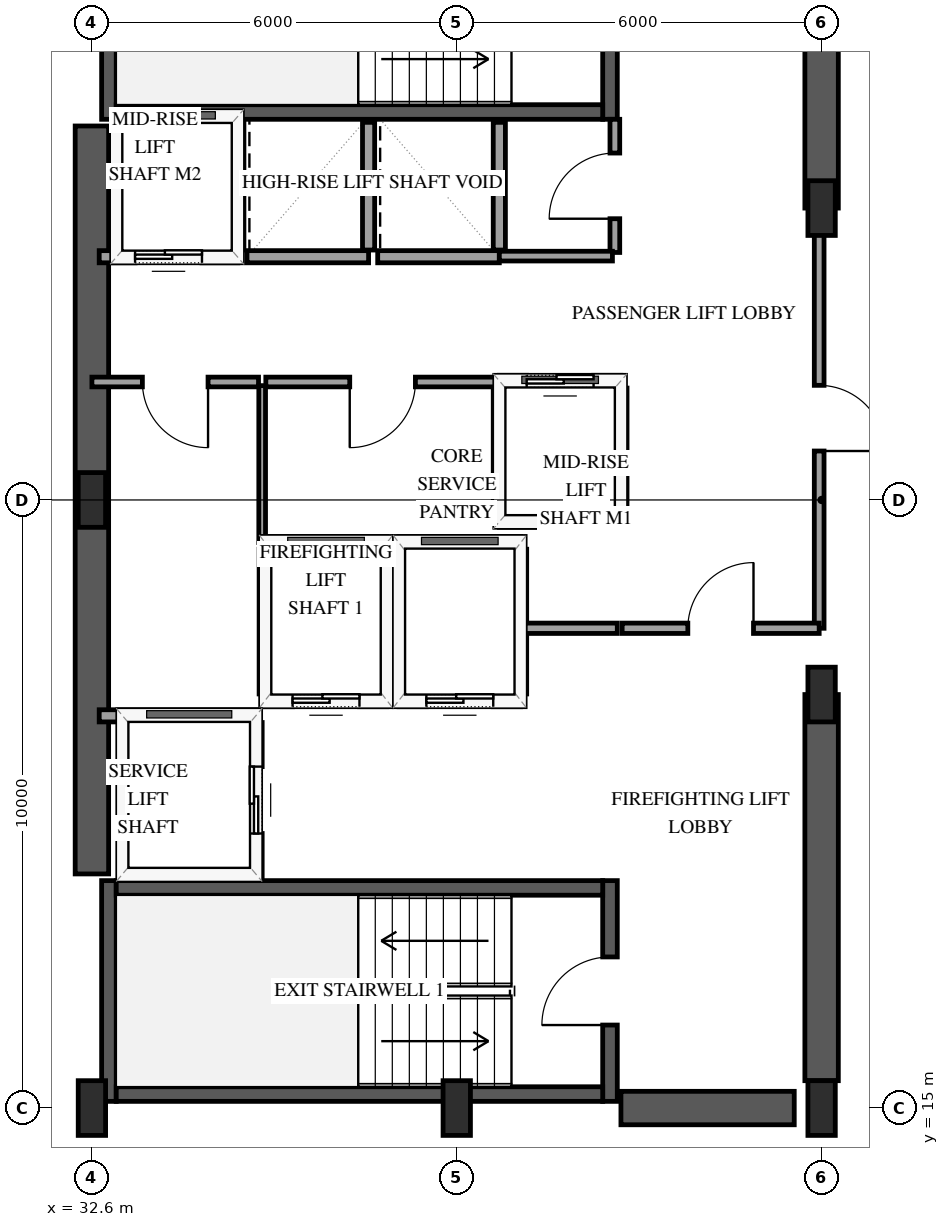
"""IFC4 building model, lengths in metres.
Left out: names, types, materials, properties, quantities, classifications, styles, units other than length and angle.
Written with IfcOpenShell. Run it as: python <this file> out.ifc"""

import sys

from ifc_helpers import new_model, si_unit, direction, frame, frame_2d, origin, origin_2d, place, context, subcontext, project, spatial, rectangle, extrude, element, fill, save


model = new_model("IFC4")
c1 = context("Model", 3, precision=1e-05, world=origin(), true_north=direction((0.0, 1.0)))
c2 = subcontext(c1, "Body", "Model", "MODEL_VIEW")
j1 = project(units=[si_unit("LENGTHUNIT", "METRE"), si_unit("PLANEANGLEUNIT", "RADIAN")], contexts=[c1])
p1 = place(None, origin())
s1 = spatial("IfcSite", under=j1, at=p1, CompositionType="ELEMENT")
p2 = place(p1, origin())
s2 = spatial("IfcBuilding", under=s1, at=p2, CompositionType="ELEMENT")
p3 = place(p2, frame((0.0, 0.0, 178.6)))
s3 = spatial("IfcBuildingStorey", under=s2, at=p3, CompositionType="ELEMENT", Elevation=178.6)
p4 = place(p3, frame((32.88, 15.11, 0.0), z_axis=(0.0, 0.0, 1.0), x_axis=(0.0, 1.0, 0.0)))
e1 = element("IfcWall", 1, at=p4, inside=s3, PredefinedType="SHEAR", context=c2, shape_type="SweptSolid", body=[
    extrude(rectangle(XDim=3.63, YDim=0.24, at=frame_2d((1.815, 0.0))), origin(), (0.0, 0.0, 1.0), 3.6),
])
p5 = place(p3, frame((41.12, 15.11, 0.0), z_axis=(0.0, 0.0, 1.0), x_axis=(0.0, 1.0, 0.0)))
e2 = element("IfcWall", 2, at=p5, inside=s3, PredefinedType="SHEAR", context=c2, shape_type="SweptSolid", body=[
    extrude(rectangle(XDim=3.63, YDim=0.24, at=frame_2d((1.815, 0.0))), origin(), (0.0, 0.0, 1.0), 3.6),
])
p6 = place(p5, frame((1.255, 0.0, 0.0)))
e3 = element("IfcOpeningElement", 3, at=p6, cuts=e2, PredefinedType="OPENING", context=c2, shape_type="SweptSolid", body=[
    extrude(rectangle(XDim=1.12, YDim=2.15, at=frame_2d((0.56, 1.075))), frame((0.0, 0.13, 0.0), z_axis=(0.0, -1.0, 0.0), x_axis=(1.0, 0.0, 0.0)), (0.0, 0.0, 1.0), 0.26),
])
for number, where, z_axis, x_axis in (
    (4, (33.0, 15.23, 0.0), (0.0, 0.0, 1.0), (1.0, 0.0, 0.0)),
    (5, (33.0, 18.62, 0.0), (0.0, 0.0, 1.0), (1.0, 0.0, 0.0)),
):
    element("IfcWall", number, at=place(p3, frame(where, z_axis=z_axis, x_axis=x_axis)), inside=s3, PredefinedType="SHEAR", context=c2, shape_type="SweptSolid", body=[
        extrude(rectangle(XDim=8.0, YDim=0.24, at=frame_2d((4.0, 0.0))), origin(), (0.0, 0.0, 1.0), 3.6),
    ])
p7 = place(p3, frame((32.88, 31.26, 0.0), z_axis=(0.0, 0.0, 1.0), x_axis=(0.0, 1.0, 0.0)))
e6 = element("IfcWall", 6, at=p7, inside=s3, PredefinedType="SHEAR", context=c2, shape_type="SweptSolid", body=[
    extrude(rectangle(XDim=3.63, YDim=0.24, at=frame_2d((1.815, 0.0))), origin(), (0.0, 0.0, 1.0), 3.6),
])
p8 = place(p3, frame((41.12, 31.26, 0.0), z_axis=(0.0, 0.0, 1.0), x_axis=(0.0, 1.0, 0.0)))
e7 = element("IfcWall", 7, at=p8, inside=s3, PredefinedType="SHEAR", context=c2, shape_type="SweptSolid", body=[
    extrude(rectangle(XDim=3.63, YDim=0.24, at=frame_2d((1.815, 0.0))), origin(), (0.0, 0.0, 1.0), 3.6),
])
p9 = place(p8, frame((1.255, 0.0, 0.0)))
e8 = element("IfcOpeningElement", 8, at=p9, cuts=e7, PredefinedType="OPENING", context=c2, shape_type="SweptSolid", body=[
    extrude(rectangle(XDim=1.12, YDim=2.15, at=frame_2d((0.56, 1.075))), frame((0.0, 0.13, 0.0), z_axis=(0.0, -1.0, 0.0), x_axis=(1.0, 0.0, 0.0)), (0.0, 0.0, 1.0), 0.26),
])
p10 = place(p3, frame((33.0, 31.38, 0.0), z_axis=(0.0, 0.0, 1.0), x_axis=(1.0, 0.0, 0.0)))
e9 = element("IfcWall", 9, at=p10, inside=s3, PredefinedType="SHEAR", context=c2, shape_type="SweptSolid", body=[
    extrude(rectangle(XDim=8.0, YDim=0.24, at=frame_2d((4.0, 0.0))), origin(), (0.0, 0.0, 1.0), 3.6),
])
p11 = place(p3, frame((32.6, 18.85, 0.0), z_axis=(0.0, 0.0, 1.0), x_axis=(0.0, 1.0, 0.0)))
e10 = element("IfcWall", 10, at=p11, inside=s3, PredefinedType="SHEAR", context=c2, shape_type="SweptSolid", body=[
    extrude(rectangle(XDim=12.3, YDim=0.55, at=frame_2d((6.15, 0.0))), origin(), (0.0, 0.0, 1.0), 3.6),
])
p12 = place(p3, frame((41.3, 15.0, 0.0), z_axis=(0.0, 0.0, 1.0), x_axis=(1.0, 0.0, 0.0)))
e11 = element("IfcWall", 11, at=p12, inside=s3, PredefinedType="SHEAR", context=c2, shape_type="SweptSolid", body=[
    extrude(rectangle(XDim=2.85, YDim=0.55, at=frame_2d((1.425, 0.0))), origin(), (0.0, 0.0, 1.0), 3.6),
])
p13 = place(p3, frame((44.6, 15.45, 0.0), z_axis=(0.0, 0.0, 1.0), x_axis=(0.0, 1.0, 0.0)))
e12 = element("IfcWall", 12, at=p13, inside=s3, PredefinedType="SHEAR", context=c2, shape_type="SweptSolid", body=[
    extrude(rectangle(XDim=6.35, YDim=0.55, at=frame_2d((3.175, 0.0))), origin(), (0.0, 0.0, 1.0), 3.6),
])
p14 = place(p3, frame((44.6, 29.8, 0.0), z_axis=(0.0, 0.0, 1.0), x_axis=(0.0, 1.0, 0.0)))
e13 = element("IfcWall", 13, at=p14, inside=s3, PredefinedType="SHEAR", context=c2, shape_type="SweptSolid", body=[
    extrude(rectangle(XDim=4.75, YDim=0.55, at=frame_2d((2.375, 0.0))), origin(), (0.0, 0.0, 1.0), 3.6),
])
for number, where, z_axis, x_axis in (
    (14, (32.6, 15.0, 0.0), (0.0, 0.0, 1.0), (1.0, 0.0, 0.0)),
    (15, (32.6, 25.0, 0.0), (0.0, 0.0, 1.0), (1.0, 0.0, 0.0)),
    (16, (38.6, 15.0, 0.0), (0.0, 0.0, 1.0), (1.0, 0.0, 0.0)),
    (17, (44.6, 15.0, 0.0), (0.0, 0.0, 1.0), (1.0, 0.0, 0.0)),
    (18, (44.6, 21.8, 0.0), (0.0, 0.0, 1.0), (1.0, 0.0, 0.0)),
    (19, (44.6, 29.8, 0.0), (0.0, 0.0, 1.0), (1.0, 0.0, 0.0)),
):
    element("IfcColumn", number, at=place(p3, frame(where, z_axis=z_axis, x_axis=x_axis)), inside=s3, PredefinedType="PILASTER", context=c2, shape_type="SweptSolid", body=[
        extrude(rectangle(XDim=0.45, YDim=0.9, at=origin_2d()), origin(), (0.0, 0.0, 1.0), 3.6),
    ])
p15 = place(p3, frame((35.45, 21.7, 0.0), z_axis=(0.0, 0.0, 1.0), x_axis=(1.0, 0.0, 0.0)))
e20 = element("IfcWall", 20, at=p15, inside=s3, PredefinedType="SOLIDWALL", context=c2, shape_type="SweptSolid", body=[
    extrude(rectangle(XDim=2.0, YDim=0.2, at=frame_2d((1.0, 0.0))), origin(), (0.0, 0.0, 1.0), 3.3),
])
p16 = place(p15, frame((0.45, 0.0, 0.0)))
e21 = element("IfcOpeningElement", 21, at=p16, cuts=e20, PredefinedType="OPENING", context=c2, shape_type="SweptSolid", body=[
    extrude(rectangle(XDim=1.1, YDim=2.15, at=frame_2d((0.55, 1.075))), frame((0.0, 0.11, 0.0), z_axis=(0.0, -1.0, 0.0), x_axis=(1.0, 0.0, 0.0)), (0.0, 0.0, 1.0), 0.22),
])
p17 = place(p3, frame((35.45, 24.3, 0.0), z_axis=(0.0, 0.0, 1.0), x_axis=(1.0, 0.0, 0.0)))
e22 = element("IfcWall", 22, at=p17, inside=s3, PredefinedType="SOLIDWALL", context=c2, shape_type="SweptSolid", body=[
    extrude(rectangle(XDim=2.0, YDim=0.2, at=frame_2d((1.0, 0.0))), origin(), (0.0, 0.0, 1.0), 3.3),
])
for number, where, z_axis, x_axis in (
    (23, (35.45, 21.81, 0.0), (0.0, 0.0, 1.0), (0.0, 1.0, 0.0)),
    (24, (37.45, 21.81, 0.0), (0.0, 0.0, 1.0), (0.0, 1.0, 0.0)),
):
    element("IfcWall", number, at=place(p3, frame(where, z_axis=z_axis, x_axis=x_axis)), inside=s3, PredefinedType="SOLIDWALL", context=c2, shape_type="SweptSolid", body=[
        extrude(rectangle(XDim=2.38, YDim=0.2, at=frame_2d((1.19, 0.0))), origin(), (0.0, 0.0, 1.0), 3.3),
    ])
p18 = place(p3, frame((37.65, 21.7, 0.0), z_axis=(0.0, 0.0, 1.0), x_axis=(1.0, 0.0, 0.0)))
e25 = element("IfcWall", 25, at=p18, inside=s3, PredefinedType="SOLIDWALL", context=c2, shape_type="SweptSolid", body=[
    extrude(rectangle(XDim=2.0, YDim=0.2, at=frame_2d((1.0, 0.0))), origin(), (0.0, 0.0, 1.0), 3.3),
])
p19 = place(p18, frame((0.45, 0.0, 0.0)))
e26 = element("IfcOpeningElement", 26, at=p19, cuts=e25, PredefinedType="OPENING", context=c2, shape_type="SweptSolid", body=[
    extrude(rectangle(XDim=1.1, YDim=2.15, at=frame_2d((0.55, 1.075))), frame((0.0, 0.11, 0.0), z_axis=(0.0, -1.0, 0.0), x_axis=(1.0, 0.0, 0.0)), (0.0, 0.0, 1.0), 0.22),
])
p20 = place(p3, frame((37.65, 24.3, 0.0), z_axis=(0.0, 0.0, 1.0), x_axis=(1.0, 0.0, 0.0)))
e27 = element("IfcWall", 27, at=p20, inside=s3, PredefinedType="SOLIDWALL", context=c2, shape_type="SweptSolid", body=[
    extrude(rectangle(XDim=2.0, YDim=0.2, at=frame_2d((1.0, 0.0))), origin(), (0.0, 0.0, 1.0), 3.3),
])
p21 = place(p3, frame((39.65, 21.81, 0.0), z_axis=(0.0, 0.0, 1.0), x_axis=(0.0, 1.0, 0.0)))
e28 = element("IfcWall", 28, at=p21, inside=s3, PredefinedType="SOLIDWALL", context=c2, shape_type="SweptSolid", body=[
    extrude(rectangle(XDim=2.38, YDim=0.2, at=frame_2d((1.19, 0.0))), origin(), (0.0, 0.0, 1.0), 3.3),
])
p22 = place(p3, frame((32.72, 21.45, 0.0), z_axis=(0.0, 0.0, 1.0), x_axis=(1.0, 0.0, 0.0)))
e29 = element("IfcWall", 29, at=p22, inside=s3, PredefinedType="SOLIDWALL", context=c2, shape_type="SweptSolid", body=[
    extrude(rectangle(XDim=2.58, YDim=0.2, at=frame_2d((1.29, 0.0))), origin(), (0.0, 0.0, 1.0), 3.3),
])
p23 = place(p3, frame((35.3, 18.79, 0.0), z_axis=(0.0, 0.0, 1.0), x_axis=(0.0, 1.0, 0.0)))
e30 = element("IfcWall", 30, at=p23, inside=s3, PredefinedType="SOLIDWALL", context=c2, shape_type="SweptSolid", body=[
    extrude(rectangle(XDim=2.55, YDim=0.2, at=frame_2d((1.275, 0.0))), origin(), (0.0, 0.0, 1.0), 3.3),
])
p24 = place(p23, frame((0.725, 0.0, 0.0)))
e31 = element("IfcOpeningElement", 31, at=p24, cuts=e30, PredefinedType="OPENING", context=c2, shape_type="SweptSolid", body=[
    extrude(rectangle(XDim=1.1, YDim=2.15, at=frame_2d((0.55, 1.075))), frame((0.0, 0.11, 0.0), z_axis=(0.0, -1.0, 0.0), x_axis=(1.0, 0.0, 0.0)), (0.0, 0.0, 1.0), 0.22),
])
p25 = place(p3, frame((39.3, 24.65, 0.0), z_axis=(0.0, 0.0, 1.0), x_axis=(1.0, 0.0, 0.0)))
e32 = element("IfcWall", 32, at=p25, inside=s3, PredefinedType="SOLIDWALL", context=c2, shape_type="SweptSolid", body=[
    extrude(rectangle(XDim=2.0, YDim=0.2, at=frame_2d((1.0, 0.0))), origin(), (0.0, 0.0, 1.0), 3.3),
])
p26 = place(p3, frame((39.3, 26.95, 0.0), z_axis=(0.0, 0.0, 1.0), x_axis=(1.0, 0.0, 0.0)))
e33 = element("IfcWall", 33, at=p26, inside=s3, PredefinedType="SOLIDWALL", context=c2, shape_type="SweptSolid", body=[
    extrude(rectangle(XDim=2.0, YDim=0.2, at=frame_2d((1.0, 0.0))), origin(), (0.0, 0.0, 1.0), 3.3),
])
p27 = place(p26, frame((0.45, 0.0, 0.0)))
e34 = element("IfcOpeningElement", 34, at=p27, cuts=e33, PredefinedType="OPENING", context=c2, shape_type="SweptSolid", body=[
    extrude(rectangle(XDim=1.1, YDim=2.15, at=frame_2d((0.55, 1.075))), frame((0.0, 0.11, 0.0), z_axis=(0.0, -1.0, 0.0), x_axis=(1.0, 0.0, 0.0)), (0.0, 0.0, 1.0), 0.22),
])
for number, where, z_axis, x_axis in (
    (35, (39.3, 24.76, 0.0), (0.0, 0.0, 1.0), (0.0, 1.0, 0.0)),
    (36, (41.3, 24.76, 0.0), (0.0, 0.0, 1.0), (0.0, 1.0, 0.0)),
):
    element("IfcWall", number, at=place(p3, frame(where, z_axis=z_axis, x_axis=x_axis)), inside=s3, PredefinedType="SOLIDWALL", context=c2, shape_type="SweptSolid", body=[
        extrude(rectangle(XDim=2.08, YDim=0.2, at=frame_2d((1.04, 0.0))), origin(), (0.0, 0.0, 1.0), 3.3),
    ])
p28 = place(p3, frame((32.72, 29.0, 0.0), z_axis=(0.0, 0.0, 1.0), x_axis=(1.0, 0.0, 0.0)))
e37 = element("IfcWall", 37, at=p28, inside=s3, PredefinedType="SOLIDWALL", context=c2, shape_type="SweptSolid", body=[
    extrude(rectangle(XDim=2.28, YDim=0.2, at=frame_2d((1.14, 0.0))), origin(), (0.0, 0.0, 1.0), 3.3),
])
p29 = place(p28, frame((0.59, 0.0, 0.0)))
e38 = element("IfcOpeningElement", 38, at=p29, cuts=e37, PredefinedType="OPENING", context=c2, shape_type="SweptSolid", body=[
    extrude(rectangle(XDim=1.1, YDim=2.15, at=frame_2d((0.55, 1.075))), frame((0.0, 0.11, 0.0), z_axis=(0.0, -1.0, 0.0), x_axis=(1.0, 0.0, 0.0)), (0.0, 0.0, 1.0), 0.22),
])
p30 = place(p3, frame((35.0, 29.11, 0.0), z_axis=(0.0, 0.0, 1.0), x_axis=(0.0, 1.0, 0.0)))
e39 = element("IfcWall", 39, at=p30, inside=s3, PredefinedType="SOLIDWALL", context=c2, shape_type="SweptSolid", body=[
    extrude(rectangle(XDim=2.1, YDim=0.2, at=frame_2d((1.05, 0.0))), origin(), (0.0, 0.0, 1.0), 3.3),
])
p31 = place(p3, frame((35.15, 29.0, 0.0), z_axis=(0.0, 0.0, 1.0), x_axis=(1.0, 0.0, 0.0)))
e40 = element("IfcWall", 40, at=p31, inside=s3, PredefinedType="SOLIDWALL", context=c2, shape_type="SweptSolid", body=[
    extrude(rectangle(XDim=2.0, YDim=0.2, at=frame_2d((1.0, 0.0))), origin(), (0.0, 0.0, 1.0), 3.3),
])
p32 = place(p3, frame((37.15, 29.11, 0.0), z_axis=(0.0, 0.0, 1.0), x_axis=(0.0, 1.0, 0.0)))
e41 = element("IfcWall", 41, at=p32, inside=s3, PredefinedType="SOLIDWALL", context=c2, shape_type="SweptSolid", body=[
    extrude(rectangle(XDim=2.1, YDim=0.2, at=frame_2d((1.05, 0.0))), origin(), (0.0, 0.0, 1.0), 3.3),
])
p33 = place(p3, frame((37.3, 29.0, 0.0), z_axis=(0.0, 0.0, 1.0), x_axis=(1.0, 0.0, 0.0)))
e42 = element("IfcWall", 42, at=p33, inside=s3, PredefinedType="SOLIDWALL", context=c2, shape_type="SweptSolid", body=[
    extrude(rectangle(XDim=2.0, YDim=0.2, at=frame_2d((1.0, 0.0))), origin(), (0.0, 0.0, 1.0), 3.3),
])
p34 = place(p3, frame((39.3, 29.11, 0.0), z_axis=(0.0, 0.0, 1.0), x_axis=(0.0, 1.0, 0.0)))
e43 = element("IfcWall", 43, at=p34, inside=s3, PredefinedType="SOLIDWALL", context=c2, shape_type="SweptSolid", body=[
    extrude(rectangle(XDim=2.1, YDim=0.2, at=frame_2d((1.05, 0.0))), origin(), (0.0, 0.0, 1.0), 3.3),
])
p35 = place(p3, frame((44.56, 29.8, 0.0), z_axis=(0.0, 0.0, 1.0), x_axis=(0.0, -1.0, 0.0)))
e44 = element("IfcWall", 44, at=p35, inside=s3, PredefinedType="PARTITIONING", context=c2, shape_type="SweptSolid", body=[
    extrude(rectangle(XDim=6.91, YDim=0.16, at=frame_2d((3.455, 0.0))), origin(), (0.0, 0.0, 1.0), 2.34),
])
p36 = place(p35, frame((2.915, 0.0, 0.0)))
e45 = element("IfcOpeningElement", 45, at=p36, cuts=e44, PredefinedType="OPENING", context=c2, shape_type="SweptSolid", body=[
    extrude(rectangle(XDim=1.08, YDim=2.15, at=frame_2d((0.54, 1.075))), frame((0.0, 0.09, 0.0), z_axis=(0.0, -1.0, 0.0), x_axis=(1.0, 0.0, 0.0)), (0.0, 0.0, 1.0), 0.18),
])
p37 = place(p3, frame((39.3, 26.94, 0.0), z_axis=(0.0, 0.0, 1.0), x_axis=(-1.0, 0.0, 0.0)))
e46 = element("IfcWall", 46, at=p37, inside=s3, PredefinedType="PARTITIONING", context=c2, shape_type="SweptSolid", body=[
    extrude(rectangle(XDim=3.84, YDim=0.16, at=frame_2d((1.92, 0.0))), origin(), (0.0, 0.0, 1.0), 3.3),
])
p38 = place(p37, frame((1.38, 0.0, 0.0)))
e47 = element("IfcOpeningElement", 47, at=p38, cuts=e46, PredefinedType="OPENING", context=c2, shape_type="SweptSolid", body=[
    extrude(rectangle(XDim=1.08, YDim=2.15, at=frame_2d((0.54, 1.075))), frame((0.0, 0.09, 0.0), z_axis=(0.0, -1.0, 0.0), x_axis=(1.0, 0.0, 0.0)), (0.0, 0.0, 1.0), 0.18),
])
p39 = place(p3, frame((41.32, 22.89, 0.0), z_axis=(0.0, 0.0, 1.0), x_axis=(1.0, 0.0, 0.0)))
e48 = element("IfcWall", 48, at=p39, inside=s3, PredefinedType="PARTITIONING", context=c2, shape_type="SweptSolid", body=[
    extrude(rectangle(XDim=3.24, YDim=0.17, at=frame_2d((1.62, 0.0))), origin(), (0.0, 0.0, 1.0), 3.3),
])
p40 = place(p39, frame((1.08, 0.0, 0.0)))
e49 = element("IfcOpeningElement", 49, at=p40, cuts=e48, PredefinedType="OPENING", context=c2, shape_type="SweptSolid", body=[
    extrude(rectangle(XDim=1.08, YDim=2.15, at=frame_2d((0.54, 1.075))), frame((0.0, 0.095, 0.0), z_axis=(0.0, -1.0, 0.0), x_axis=(1.0, 0.0, 0.0)), (0.0, 0.0, 1.0), 0.19),
])
p41 = place(p3, frame((35.34, 26.94, 0.0), z_axis=(0.0, 0.0, 1.0), x_axis=(-1.0, 0.0, 0.0)))
e50 = element("IfcWall", 50, at=p41, inside=s3, PredefinedType="PARTITIONING", context=c2, shape_type="SweptSolid", body=[
    extrude(rectangle(XDim=2.74, YDim=0.16, at=frame_2d((1.37, 0.0))), origin(), (0.0, 0.0, 1.0), 3.3),
])
p42 = place(p41, frame((0.83, 0.0, 0.0)))
e51 = element("IfcOpeningElement", 51, at=p42, cuts=e50, PredefinedType="OPENING", context=c2, shape_type="SweptSolid", body=[
    extrude(rectangle(XDim=1.08, YDim=2.15, at=frame_2d((0.54, 1.075))), frame((0.0, 0.09, 0.0), z_axis=(0.0, -1.0, 0.0), x_axis=(1.0, 0.0, 0.0)), (0.0, 0.0, 1.0), 0.18),
])
p43 = place(p3, frame((35.4, 26.88, 0.0), z_axis=(0.0, 0.0, 1.0), x_axis=(0.0, -1.0, 0.0)))
e52 = element("IfcWall", 52, at=p43, inside=s3, PredefinedType="PARTITIONING", context=c2, shape_type="SweptSolid", body=[
    extrude(rectangle(XDim=2.58, YDim=0.11, at=frame_2d((1.29, 0.0))), origin(), (0.0, 0.0, 1.0), 3.3),
])
p44 = place(p3, frame((41.2, 29.07, 0.0), z_axis=(0.0, 0.0, 1.0), x_axis=(0.0, 1.0, 0.0)))
e53 = element("IfcWall", 53, at=p44, inside=s3, PredefinedType="PARTITIONING", context=c2, shape_type="SweptSolid", body=[
    extrude(rectangle(XDim=2.19, YDim=0.16, at=frame_2d((1.095, 0.0))), origin(), (0.0, 0.0, 1.0), 3.3),
])
p45 = place(p44, frame((0.555, 0.0, 0.0)))
e54 = element("IfcOpeningElement", 54, at=p45, cuts=e53, PredefinedType="OPENING", context=c2, shape_type="SweptSolid", body=[
    extrude(rectangle(XDim=1.08, YDim=2.15, at=frame_2d((0.54, 1.075))), frame((0.0, 0.09, 0.0), z_axis=(0.0, -1.0, 0.0), x_axis=(1.0, 0.0, 0.0)), (0.0, 0.0, 1.0), 0.18),
])
p46 = place(p3, frame((39.3, 29.01, 0.0), z_axis=(0.0, 0.0, 1.0), x_axis=(1.0, 0.0, 0.0)))
e55 = element("IfcWall", 55, at=p46, inside=s3, PredefinedType="PARTITIONING", context=c2, shape_type="SweptSolid", body=[
    extrude(rectangle(XDim=1.86, YDim=0.16, at=frame_2d((0.93, 0.0))), origin(), (0.0, 0.0, 1.0), 3.3),
])
p47 = place(p3, frame((39.72, 22.89, 0.0), z_axis=(0.0, 0.0, 1.0), x_axis=(1.0, 0.0, 0.0)))
e56 = element("IfcWall", 56, at=p47, inside=s3, PredefinedType="PARTITIONING", context=c2, shape_type="SweptSolid", body=[
    extrude(rectangle(XDim=1.52, YDim=0.17, at=frame_2d((0.76, 0.0))), origin(), (0.0, 0.0, 1.0), 3.3),
])
p48 = place(p16, origin())
e57 = element("IfcDoor", 57, at=p48, inside=s3, OperationType="SLIDING_TO_LEFT", PredefinedType="DOOR", context=c2, shape_type="SweptSolid", body=[
    extrude(rectangle(XDim=1.1, YDim=2.15, at=frame_2d((0.55, 1.075))), frame((0.0, 0.025, 0.0), z_axis=(0.0, -1.0, 0.0), x_axis=(1.0, 0.0, 0.0)), (0.0, 0.0, 1.0), 0.05),
])
fill(e21, e57)
p49 = place(p19, origin())
e58 = element("IfcDoor", 58, at=p49, inside=s3, OperationType="SLIDING_TO_LEFT", PredefinedType="DOOR", context=c2, shape_type="SweptSolid", body=[
    extrude(rectangle(XDim=1.1, YDim=2.15, at=frame_2d((0.55, 1.075))), frame((0.0, 0.025, 0.0), z_axis=(0.0, -1.0, 0.0), x_axis=(1.0, 0.0, 0.0)), (0.0, 0.0, 1.0), 0.05),
])
fill(e26, e58)
p50 = place(p24, origin())
e59 = element("IfcDoor", 59, at=p50, inside=s3, OperationType="SLIDING_TO_LEFT", PredefinedType="DOOR", context=c2, shape_type="SweptSolid", body=[
    extrude(rectangle(XDim=1.1, YDim=2.15, at=frame_2d((0.55, 1.075))), frame((0.0, 0.025, 0.0), z_axis=(0.0, -1.0, 0.0), x_axis=(1.0, 0.0, 0.0)), (0.0, 0.0, 1.0), 0.05),
])
fill(e31, e59)
p51 = place(p27, origin())
e60 = element("IfcDoor", 60, at=p51, inside=s3, OperationType="SLIDING_TO_LEFT", PredefinedType="DOOR", context=c2, shape_type="SweptSolid", body=[
    extrude(rectangle(XDim=1.1, YDim=2.15, at=frame_2d((0.55, 1.075))), frame((0.0, 0.025, 0.0), z_axis=(0.0, -1.0, 0.0), x_axis=(1.0, 0.0, 0.0)), (0.0, 0.0, 1.0), 0.05),
])
fill(e34, e60)
p52 = place(p29, origin())
e61 = element("IfcDoor", 61, at=p52, inside=s3, OperationType="SLIDING_TO_LEFT", PredefinedType="DOOR", context=c2, shape_type="SweptSolid", body=[
    extrude(rectangle(XDim=1.1, YDim=2.15, at=frame_2d((0.55, 1.075))), frame((0.0, 0.025, 0.0), z_axis=(0.0, -1.0, 0.0), x_axis=(1.0, 0.0, 0.0)), (0.0, 0.0, 1.0), 0.05),
])
fill(e38, e61)
p53 = place(p6, origin())
e62 = element("IfcDoor", 62, at=p53, inside=s3, OperationType="SINGLE_SWING_LEFT", PredefinedType="DOOR", context=c2, shape_type="SweptSolid", body=[
    extrude(rectangle(XDim=1.12, YDim=2.15, at=frame_2d((0.56, 1.075))), frame((0.0, 0.025, 0.0), z_axis=(0.0, -1.0, 0.0), x_axis=(1.0, 0.0, 0.0)), (0.0, 0.0, 1.0), 0.05),
])
fill(e3, e62)
p54 = place(p36, origin())
e63 = element("IfcDoor", 63, at=p54, inside=s3, OperationType="SINGLE_SWING_RIGHT", PredefinedType="DOOR", context=c2, shape_type="SweptSolid", body=[
    extrude(rectangle(XDim=1.08, YDim=2.15, at=frame_2d((0.54, 1.075))), frame((0.0, 0.025, 0.0), z_axis=(0.0, -1.0, 0.0), x_axis=(1.0, 0.0, 0.0)), (0.0, 0.0, 1.0), 0.05),
])
fill(e45, e63)
p55 = place(p38, origin())
e64 = element("IfcDoor", 64, at=p55, inside=s3, OperationType="SINGLE_SWING_RIGHT", PredefinedType="DOOR", context=c2, shape_type="SweptSolid", body=[
    extrude(rectangle(XDim=1.08, YDim=2.15, at=frame_2d((0.54, 1.075))), frame((0.0, 0.025, 0.0), z_axis=(0.0, -1.0, 0.0), x_axis=(1.0, 0.0, 0.0)), (0.0, 0.0, 1.0), 0.05),
])
fill(e47, e64)
p56 = place(p40, origin())
e65 = element("IfcDoor", 65, at=p56, inside=s3, OperationType="SINGLE_SWING_RIGHT", PredefinedType="DOOR", context=c2, shape_type="SweptSolid", body=[
    extrude(rectangle(XDim=1.08, YDim=2.15, at=frame_2d((0.54, 1.075))), frame((0.0, 0.025, 0.0), z_axis=(0.0, -1.0, 0.0), x_axis=(1.0, 0.0, 0.0)), (0.0, 0.0, 1.0), 0.05),
])
fill(e49, e65)
p57 = place(p42, origin())
e66 = element("IfcDoor", 66, at=p57, inside=s3, OperationType="SINGLE_SWING_LEFT", PredefinedType="DOOR", context=c2, shape_type="SweptSolid", body=[
    extrude(rectangle(XDim=1.08, YDim=2.15, at=frame_2d((0.54, 1.075))), frame((0.0, 0.025, 0.0), z_axis=(0.0, -1.0, 0.0), x_axis=(1.0, 0.0, 0.0)), (0.0, 0.0, 1.0), 0.05),
])
fill(e51, e66)
p58 = place(p45, origin())
e67 = element("IfcDoor", 67, at=p58, inside=s3, OperationType="SINGLE_SWING_LEFT", PredefinedType="DOOR", context=c2, shape_type="SweptSolid", body=[
    extrude(rectangle(XDim=1.08, YDim=2.15, at=frame_2d((0.54, 1.075))), frame((0.0, 0.025, 0.0), z_axis=(0.0, -1.0, 0.0), x_axis=(1.0, 0.0, 0.0)), (0.0, 0.0, 1.0), 0.05),
])
fill(e54, e67)
save(model, sys.argv[1])
